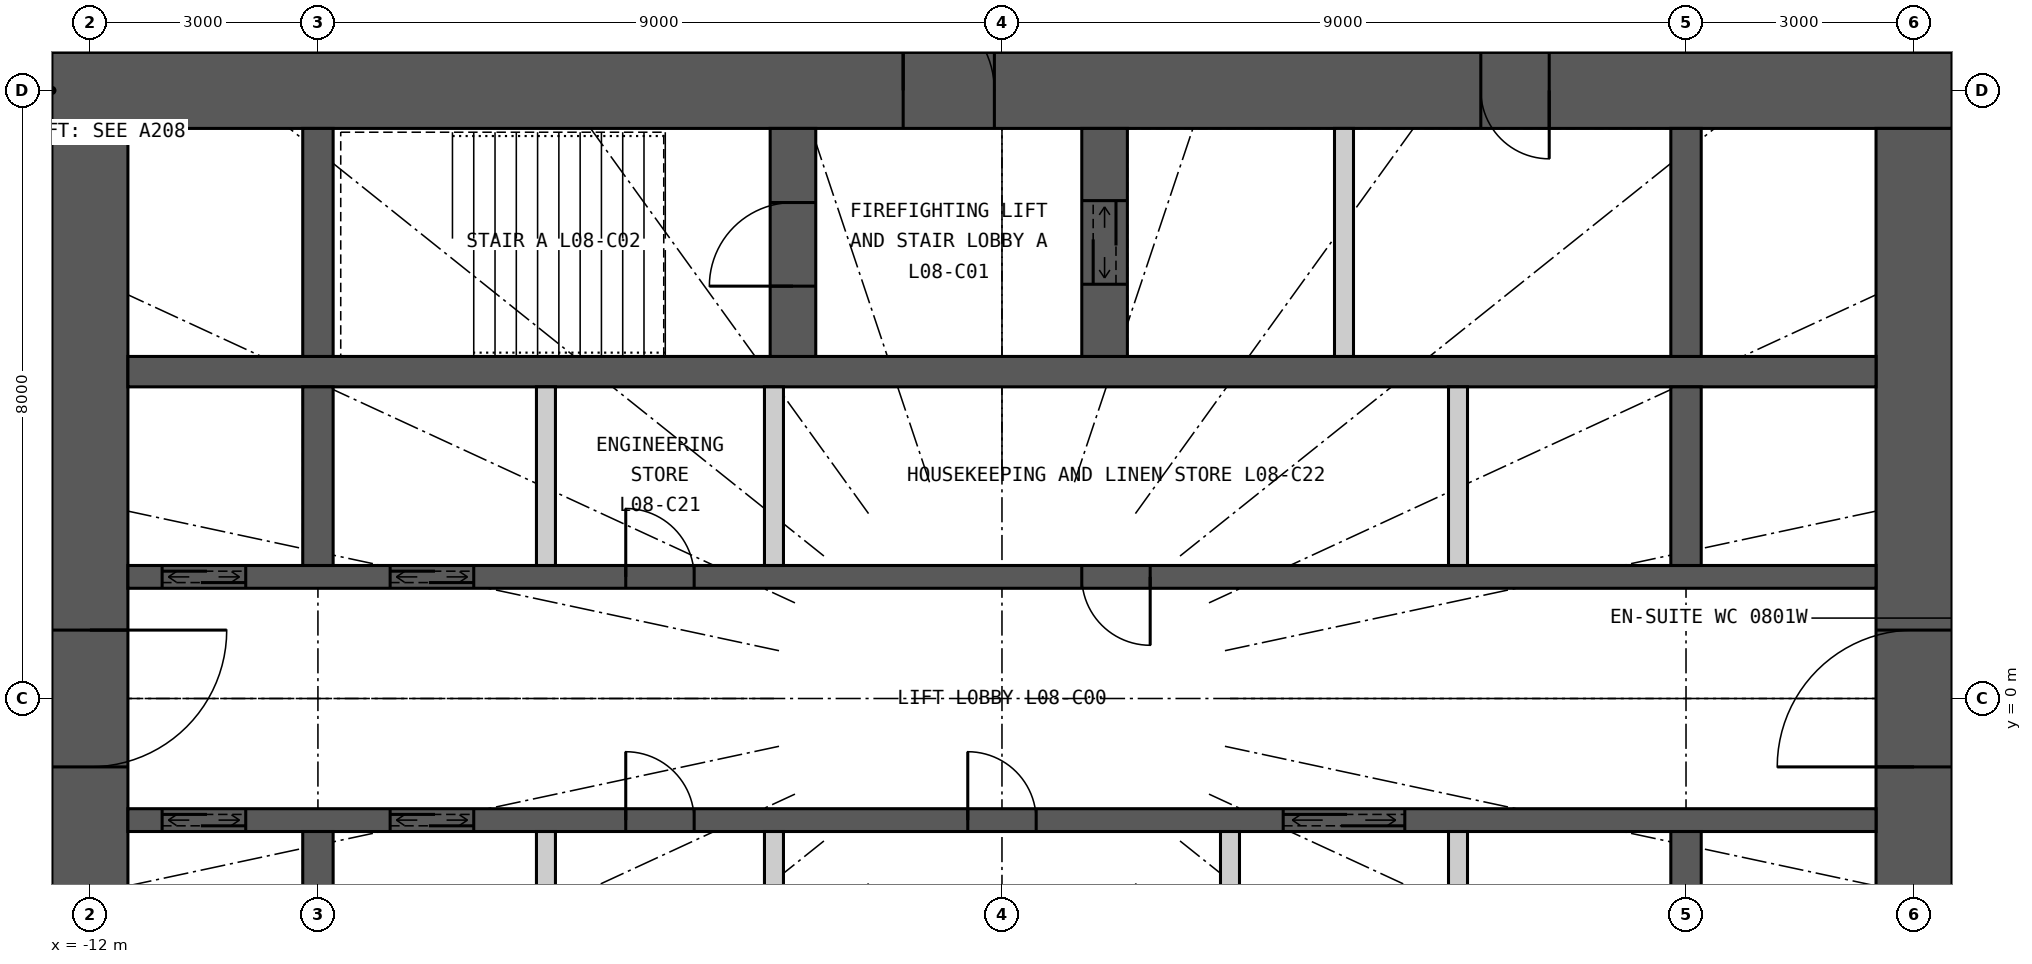
"""IFC4 building model, lengths in metres.
Left out: names, types, materials, properties, quantities, classifications, styles, units other than length and angle.
Written with IfcOpenShell. Run it as: python <this file> out.ifc"""

import sys

from ifc_helpers import new_model, si_unit, direction, frame, frame_2d, origin, place, context, subcontext, project, spatial, rectangle, extrude, element, fill, save


model = new_model("IFC4")
c1 = context("Model", 3, precision=1e-05, world=origin(), true_north=direction((0.0, 1.0)))
c2 = subcontext(c1, "Body", "Model", "MODEL_VIEW")
j1 = project(units=[si_unit("LENGTHUNIT", "METRE"), si_unit("PLANEANGLEUNIT", "RADIAN")], contexts=[c1])
p1 = place(None, origin())
s1 = spatial("IfcSite", under=j1, at=p1, CompositionType="ELEMENT")
p2 = place(p1, origin())
s2 = spatial("IfcBuilding", under=s1, at=p2, CompositionType="ELEMENT")
p3 = place(p2, frame((0.0, 0.0, 39.3)))
s3 = spatial("IfcBuildingStorey", under=s2, at=p3, CompositionType="ELEMENT", Elevation=39.3)
p4 = place(p3, frame((-12.5, 8.0, 0.0), z_axis=(0.0, 0.0, 1.0), x_axis=(1.0, 0.0, 0.0)))
e1 = element("IfcWall", 1, at=p4, inside=s3, PredefinedType="SHEAR", context=c2, shape_type="SweptSolid", body=[
    extrude(rectangle(XDim=25.0, YDim=1.0, at=frame_2d((12.5, 0.0))), origin(), (0.0, 0.0, 1.0), 3.3),
])
p5 = place(p4, frame((11.2, 0.0, 0.0)))
e2 = element("IfcOpeningElement", 2, at=p5, cuts=e1, PredefinedType="OPENING", context=c2, shape_type="SweptSolid", body=[
    extrude(rectangle(XDim=1.2, YDim=2.2, at=frame_2d((0.6, 1.1))), frame((0.0, 0.51, 0.0), z_axis=(0.0, -1.0, 0.0), x_axis=(1.0, 0.0, 0.0)), (0.0, 0.0, 1.0), 1.02),
])
p6 = place(p4, frame((18.8, 0.0, 0.0)))
e3 = element("IfcOpeningElement", 3, at=p6, cuts=e1, PredefinedType="OPENING", context=c2, shape_type="SweptSolid", body=[
    extrude(rectangle(XDim=0.9, YDim=2.2, at=frame_2d((0.45, 1.1))), frame((0.0, 0.51, 0.0), z_axis=(0.0, -1.0, 0.0), x_axis=(1.0, 0.0, 0.0)), (0.0, 0.0, 1.0), 1.02),
])
p7 = place(p3, frame((12.0, -7.5, 0.0), z_axis=(0.0, 0.0, 1.0), x_axis=(0.0, 1.0, 0.0)))
e4 = element("IfcWall", 4, at=p7, inside=s3, PredefinedType="SHEAR", context=c2, shape_type="SweptSolid", body=[
    extrude(rectangle(XDim=15.0, YDim=1.0, at=frame_2d((7.5, 0.0))), origin(), (0.0, 0.0, 1.0), 3.3),
])
p8 = place(p7, frame((6.6, 0.0, 0.0)))
e5 = element("IfcOpeningElement", 5, at=p8, cuts=e4, PredefinedType="OPENING", context=c2, shape_type="SweptSolid", body=[
    extrude(rectangle(XDim=1.8, YDim=2.2, at=frame_2d((0.9, 1.1))), frame((0.0, 0.51, 0.0), z_axis=(0.0, -1.0, 0.0), x_axis=(1.0, 0.0, 0.0)), (0.0, 0.0, 1.0), 1.02),
])
p9 = place(p3, frame((-12.0, 7.5, 0.0), z_axis=(0.0, 0.0, 1.0), x_axis=(0.0, -1.0, 0.0)))
e6 = element("IfcWall", 6, at=p9, inside=s3, PredefinedType="SHEAR", context=c2, shape_type="SweptSolid", body=[
    extrude(rectangle(XDim=15.0, YDim=1.0, at=frame_2d((7.5, 0.0))), origin(), (0.0, 0.0, 1.0), 3.3),
])
p10 = place(p9, frame((6.6, 0.0, 0.0)))
e7 = element("IfcOpeningElement", 7, at=p10, cuts=e6, PredefinedType="OPENING", context=c2, shape_type="SweptSolid", body=[
    extrude(rectangle(XDim=1.8, YDim=2.2, at=frame_2d((0.9, 1.1))), frame((0.0, 0.51, 0.0), z_axis=(0.0, -1.0, 0.0), x_axis=(1.0, 0.0, 0.0)), (0.0, 0.0, 1.0), 1.02),
])
p11 = place(p3, frame((-11.5, 4.3, 0.0), z_axis=(0.0, 0.0, 1.0), x_axis=(1.0, 0.0, 0.0)))
e8 = element("IfcWall", 8, at=p11, inside=s3, PredefinedType="SHEAR", context=c2, shape_type="SweptSolid", body=[
    extrude(rectangle(XDim=23.0, YDim=0.4, at=frame_2d((11.5, 0.0))), origin(), (0.0, 0.0, 1.0), 3.3),
])
p12 = place(p3, frame((-11.5, 1.6, 0.0), z_axis=(0.0, 0.0, 1.0), x_axis=(1.0, 0.0, 0.0)))
e9 = element("IfcWall", 9, at=p12, inside=s3, PredefinedType="SHEAR", context=c2, shape_type="SweptSolid", body=[
    extrude(rectangle(XDim=23.0, YDim=0.3, at=frame_2d((11.5, 0.0))), origin(), (0.0, 0.0, 1.0), 3.3),
])
p13 = place(p12, frame((0.45, 0.0, 0.0)))
e10 = element("IfcOpeningElement", 10, at=p13, cuts=e9, PredefinedType="OPENING", context=c2, shape_type="SweptSolid", body=[
    extrude(rectangle(XDim=1.1, YDim=2.2, at=frame_2d((0.55, 1.1))), frame((0.0, 0.16, 0.0), z_axis=(0.0, -1.0, 0.0), x_axis=(1.0, 0.0, 0.0)), (0.0, 0.0, 1.0), 0.32),
])
p14 = place(p12, frame((3.45, 0.0, 0.0)))
e11 = element("IfcOpeningElement", 11, at=p14, cuts=e9, PredefinedType="OPENING", context=c2, shape_type="SweptSolid", body=[
    extrude(rectangle(XDim=1.1, YDim=2.2, at=frame_2d((0.55, 1.1))), frame((0.0, 0.16, 0.0), z_axis=(0.0, -1.0, 0.0), x_axis=(1.0, 0.0, 0.0)), (0.0, 0.0, 1.0), 0.32),
])
p15 = place(p12, frame((6.55, 0.0, 0.0)))
e12 = element("IfcOpeningElement", 12, at=p15, cuts=e9, PredefinedType="OPENING", context=c2, shape_type="SweptSolid", body=[
    extrude(rectangle(XDim=0.9, YDim=2.2, at=frame_2d((0.45, 1.1))), frame((0.0, 0.16, 0.0), z_axis=(0.0, -1.0, 0.0), x_axis=(1.0, 0.0, 0.0)), (0.0, 0.0, 1.0), 0.32),
])
p16 = place(p12, frame((12.55, 0.0, 0.0)))
e13 = element("IfcOpeningElement", 13, at=p16, cuts=e9, PredefinedType="OPENING", context=c2, shape_type="SweptSolid", body=[
    extrude(rectangle(XDim=0.9, YDim=2.2, at=frame_2d((0.45, 1.1))), frame((0.0, 0.16, 0.0), z_axis=(0.0, -1.0, 0.0), x_axis=(1.0, 0.0, 0.0)), (0.0, 0.0, 1.0), 0.32),
])
p17 = place(p3, frame((-11.5, -1.6, 0.0), z_axis=(0.0, 0.0, 1.0), x_axis=(1.0, 0.0, 0.0)))
e14 = element("IfcWall", 14, at=p17, inside=s3, PredefinedType="SHEAR", context=c2, shape_type="SweptSolid", body=[
    extrude(rectangle(XDim=23.0, YDim=0.3, at=frame_2d((11.5, 0.0))), origin(), (0.0, 0.0, 1.0), 3.3),
])
p18 = place(p17, frame((0.45, 0.0, 0.0)))
e15 = element("IfcOpeningElement", 15, at=p18, cuts=e14, PredefinedType="OPENING", context=c2, shape_type="SweptSolid", body=[
    extrude(rectangle(XDim=1.1, YDim=2.2, at=frame_2d((0.55, 1.1))), frame((0.0, 0.16, 0.0), z_axis=(0.0, -1.0, 0.0), x_axis=(1.0, 0.0, 0.0)), (0.0, 0.0, 1.0), 0.32),
])
p19 = place(p17, frame((3.45, 0.0, 0.0)))
e16 = element("IfcOpeningElement", 16, at=p19, cuts=e14, PredefinedType="OPENING", context=c2, shape_type="SweptSolid", body=[
    extrude(rectangle(XDim=1.1, YDim=2.2, at=frame_2d((0.55, 1.1))), frame((0.0, 0.16, 0.0), z_axis=(0.0, -1.0, 0.0), x_axis=(1.0, 0.0, 0.0)), (0.0, 0.0, 1.0), 0.32),
])
p20 = place(p17, frame((15.2, 0.0, 0.0)))
e17 = element("IfcOpeningElement", 17, at=p20, cuts=e14, PredefinedType="OPENING", context=c2, shape_type="SweptSolid", body=[
    extrude(rectangle(XDim=1.6, YDim=2.4, at=frame_2d((0.8, 1.2))), frame((0.0, 0.16, 0.0), z_axis=(0.0, -1.0, 0.0), x_axis=(1.0, 0.0, 0.0)), (0.0, 0.0, 1.0), 0.32),
])
p21 = place(p17, frame((6.55, 0.0, 0.0)))
e18 = element("IfcOpeningElement", 18, at=p21, cuts=e14, PredefinedType="OPENING", context=c2, shape_type="SweptSolid", body=[
    extrude(rectangle(XDim=0.9, YDim=2.2, at=frame_2d((0.45, 1.1))), frame((0.0, 0.16, 0.0), z_axis=(0.0, -1.0, 0.0), x_axis=(1.0, 0.0, 0.0)), (0.0, 0.0, 1.0), 0.32),
])
p22 = place(p17, frame((11.05, 0.0, 0.0)))
e19 = element("IfcOpeningElement", 19, at=p22, cuts=e14, PredefinedType="OPENING", context=c2, shape_type="SweptSolid", body=[
    extrude(rectangle(XDim=0.9, YDim=2.2, at=frame_2d((0.45, 1.1))), frame((0.0, 0.16, 0.0), z_axis=(0.0, -1.0, 0.0), x_axis=(1.0, 0.0, 0.0)), (0.0, 0.0, 1.0), 0.32),
])
p23 = place(p3, frame((-9.0, 4.5, 0.0), z_axis=(0.0, 0.0, 1.0), x_axis=(0.0, 1.0, 0.0)))
e20 = element("IfcWall", 20, at=p23, inside=s3, PredefinedType="SHEAR", context=c2, shape_type="SweptSolid", body=[
    extrude(rectangle(XDim=3.0, YDim=0.4, at=frame_2d((1.5, 0.0))), origin(), (0.0, 0.0, 1.0), 3.3),
])
for number, where, z_axis, x_axis in (
    (21, (-9.0, 1.75, 0.0), (0.0, 0.0, 1.0), (0.0, 1.0, 0.0)),
    (22, (-9.0, -4.1, 0.0), (0.0, 0.0, 1.0), (0.0, 1.0, 0.0)),
):
    element("IfcWall", number, at=place(p3, frame(where, z_axis=z_axis, x_axis=x_axis)), inside=s3, PredefinedType="SHEAR", context=c2, shape_type="SweptSolid", body=[
        extrude(rectangle(XDim=2.35, YDim=0.4, at=frame_2d((1.175, 0.0))), origin(), (0.0, 0.0, 1.0), 3.3),
    ])
p24 = place(p3, frame((9.0, 4.5, 0.0), z_axis=(0.0, 0.0, 1.0), x_axis=(0.0, 1.0, 0.0)))
e23 = element("IfcWall", 23, at=p24, inside=s3, PredefinedType="SHEAR", context=c2, shape_type="SweptSolid", body=[
    extrude(rectangle(XDim=3.0, YDim=0.4, at=frame_2d((1.5, 0.0))), origin(), (0.0, 0.0, 1.0), 3.3),
])
for number, where, z_axis, x_axis in (
    (24, (9.0, 1.75, 0.0), (0.0, 0.0, 1.0), (0.0, 1.0, 0.0)),
    (25, (9.0, -4.1, 0.0), (0.0, 0.0, 1.0), (0.0, 1.0, 0.0)),
):
    element("IfcWall", number, at=place(p3, frame(where, z_axis=z_axis, x_axis=x_axis)), inside=s3, PredefinedType="SHEAR", context=c2, shape_type="SweptSolid", body=[
        extrude(rectangle(XDim=2.35, YDim=0.4, at=frame_2d((1.175, 0.0))), origin(), (0.0, 0.0, 1.0), 3.3),
    ])
p25 = place(p3, frame((-2.75, 4.5, 0.0), z_axis=(0.0, 0.0, 1.0), x_axis=(0.0, 1.0, 0.0)))
e26 = element("IfcWall", 26, at=p25, inside=s3, PredefinedType="SHEAR", context=c2, shape_type="SweptSolid", body=[
    extrude(rectangle(XDim=3.0, YDim=0.6, at=frame_2d((1.5, 0.0))), origin(), (0.0, 0.0, 1.0), 3.3),
])
p26 = place(p25, frame((0.925, 0.0, 0.0)))
e27 = element("IfcOpeningElement", 27, at=p26, cuts=e26, PredefinedType="OPENING", context=c2, shape_type="SweptSolid", body=[
    extrude(rectangle(XDim=1.1, YDim=2.2, at=frame_2d((0.55, 1.1))), frame((0.0, 0.31, 0.0), z_axis=(0.0, -1.0, 0.0), x_axis=(1.0, 0.0, 0.0)), (0.0, 0.0, 1.0), 0.62),
])
p27 = place(p3, frame((1.35, 4.5, 0.0), z_axis=(0.0, 0.0, 1.0), x_axis=(0.0, 1.0, 0.0)))
e28 = element("IfcWall", 28, at=p27, inside=s3, PredefinedType="SHEAR", context=c2, shape_type="SweptSolid", body=[
    extrude(rectangle(XDim=3.0, YDim=0.6, at=frame_2d((1.5, 0.0))), origin(), (0.0, 0.0, 1.0), 3.3),
])
p28 = place(p27, frame((0.95, 0.0, 0.0)))
e29 = element("IfcOpeningElement", 29, at=p28, cuts=e28, PredefinedType="OPENING", context=c2, shape_type="SweptSolid", body=[
    extrude(rectangle(XDim=1.1, YDim=2.2, at=frame_2d((0.55, 1.1))), frame((0.0, 0.31, 0.0), z_axis=(0.0, -1.0, 0.0), x_axis=(1.0, 0.0, 0.0)), (0.0, 0.0, 1.0), 0.62),
])
p29 = place(p3, frame((4.5, 4.5, 0.0), z_axis=(0.0, 0.0, 1.0), x_axis=(0.0, 1.0, 0.0)))
e30 = element("IfcWall", 30, at=p29, inside=s3, PredefinedType="PARTITIONING", context=c2, shape_type="SweptSolid", body=[
    extrude(rectangle(XDim=3.0, YDim=0.25, at=frame_2d((1.5, 0.0))), origin(), (0.0, 0.0, 1.0), 3.3),
])
for number, where, z_axis, x_axis in (
    (31, (-6.0, 1.75, 0.0), (0.0, 0.0, 1.0), (0.0, 1.0, 0.0)),
    (32, (-3.0, 1.75, 0.0), (0.0, 0.0, 1.0), (0.0, 1.0, 0.0)),
    (33, (6.0, 1.75, 0.0), (0.0, 0.0, 1.0), (0.0, 1.0, 0.0)),
    (34, (-6.0, -4.1, 0.0), (0.0, 0.0, 1.0), (0.0, 1.0, 0.0)),
    (35, (-3.0, -4.1, 0.0), (0.0, 0.0, 1.0), (0.0, 1.0, 0.0)),
    (36, (3.0, -4.1, 0.0), (0.0, 0.0, 1.0), (0.0, 1.0, 0.0)),
    (37, (6.0, -4.1, 0.0), (0.0, 0.0, 1.0), (0.0, 1.0, 0.0)),
):
    element("IfcWall", number, at=place(p3, frame(where, z_axis=z_axis, x_axis=x_axis)), inside=s3, PredefinedType="PARTITIONING", context=c2, shape_type="SweptSolid", body=[
        extrude(rectangle(XDim=2.35, YDim=0.25, at=frame_2d((1.175, 0.0))), origin(), (0.0, 0.0, 1.0), 3.3),
    ])
p30 = place(p5, origin())
e38 = element("IfcDoor", 38, at=p30, inside=s3, OperationType="SINGLE_SWING_LEFT", PredefinedType="DOOR", context=c2, shape_type="SweptSolid", body=[
    extrude(rectangle(XDim=1.2, YDim=2.2, at=frame_2d((0.6, 1.1))), frame((0.0, 0.025, 0.0), z_axis=(0.0, -1.0, 0.0), x_axis=(1.0, 0.0, 0.0)), (0.0, 0.0, 1.0), 0.05),
])
fill(e2, e38)
p31 = place(p26, origin())
e39 = element("IfcDoor", 39, at=p31, inside=s3, OperationType="SINGLE_SWING_LEFT", PredefinedType="DOOR", context=c2, shape_type="SweptSolid", body=[
    extrude(rectangle(XDim=1.1, YDim=2.2, at=frame_2d((0.55, 1.1))), frame((0.0, 0.025, 0.0), z_axis=(0.0, -1.0, 0.0), x_axis=(1.0, 0.0, 0.0)), (0.0, 0.0, 1.0), 0.05),
])
fill(e27, e39)
p32 = place(p28, origin())
e40 = element("IfcDoor", 40, at=p32, inside=s3, OperationType="DOUBLE_DOOR_SLIDING", PredefinedType="DOOR", context=c2, shape_type="SweptSolid", body=[
    extrude(rectangle(XDim=1.1, YDim=2.2, at=frame_2d((0.55, 1.1))), frame((0.0, 0.025, 0.0), z_axis=(0.0, -1.0, 0.0), x_axis=(1.0, 0.0, 0.0)), (0.0, 0.0, 1.0), 0.05),
])
fill(e29, e40)
p33 = place(p6, origin())
e41 = element("IfcDoor", 41, at=p33, inside=s3, OperationType="SINGLE_SWING_RIGHT", PredefinedType="DOOR", context=c2, shape_type="SweptSolid", body=[
    extrude(rectangle(XDim=0.9, YDim=2.2, at=frame_2d((0.45, 1.1))), frame((0.0, 0.025, 0.0), z_axis=(0.0, -1.0, 0.0), x_axis=(1.0, 0.0, 0.0)), (0.0, 0.0, 1.0), 0.05),
])
fill(e3, e41)
p34 = place(p13, origin())
e42 = element("IfcDoor", 42, at=p34, inside=s3, OperationType="DOUBLE_DOOR_SLIDING", PredefinedType="DOOR", context=c2, shape_type="SweptSolid", body=[
    extrude(rectangle(XDim=1.1, YDim=2.2, at=frame_2d((0.55, 1.1))), frame((0.0, 0.025, 0.0), z_axis=(0.0, -1.0, 0.0), x_axis=(1.0, 0.0, 0.0)), (0.0, 0.0, 1.0), 0.05),
])
fill(e10, e42)
p35 = place(p14, origin())
e43 = element("IfcDoor", 43, at=p35, inside=s3, OperationType="DOUBLE_DOOR_SLIDING", PredefinedType="DOOR", context=c2, shape_type="SweptSolid", body=[
    extrude(rectangle(XDim=1.1, YDim=2.2, at=frame_2d((0.55, 1.1))), frame((0.0, 0.025, 0.0), z_axis=(0.0, -1.0, 0.0), x_axis=(1.0, 0.0, 0.0)), (0.0, 0.0, 1.0), 0.05),
])
fill(e11, e43)
p36 = place(p18, origin())
e44 = element("IfcDoor", 44, at=p36, inside=s3, OperationType="DOUBLE_DOOR_SLIDING", PredefinedType="DOOR", context=c2, shape_type="SweptSolid", body=[
    extrude(rectangle(XDim=1.1, YDim=2.2, at=frame_2d((0.55, 1.1))), frame((0.0, 0.025, 0.0), z_axis=(0.0, -1.0, 0.0), x_axis=(1.0, 0.0, 0.0)), (0.0, 0.0, 1.0), 0.05),
])
fill(e15, e44)
p37 = place(p19, origin())
e45 = element("IfcDoor", 45, at=p37, inside=s3, OperationType="DOUBLE_DOOR_SLIDING", PredefinedType="DOOR", context=c2, shape_type="SweptSolid", body=[
    extrude(rectangle(XDim=1.1, YDim=2.2, at=frame_2d((0.55, 1.1))), frame((0.0, 0.025, 0.0), z_axis=(0.0, -1.0, 0.0), x_axis=(1.0, 0.0, 0.0)), (0.0, 0.0, 1.0), 0.05),
])
fill(e16, e45)
p38 = place(p20, origin())
e46 = element("IfcDoor", 46, at=p38, inside=s3, OperationType="DOUBLE_DOOR_SLIDING", PredefinedType="DOOR", context=c2, shape_type="SweptSolid", body=[
    extrude(rectangle(XDim=1.6, YDim=2.4, at=frame_2d((0.8, 1.2))), frame((0.0, 0.025, 0.0), z_axis=(0.0, -1.0, 0.0), x_axis=(1.0, 0.0, 0.0)), (0.0, 0.0, 1.0), 0.05),
])
fill(e17, e46)
p39 = place(p15, origin())
e47 = element("IfcDoor", 47, at=p39, inside=s3, OperationType="SINGLE_SWING_LEFT", PredefinedType="DOOR", context=c2, shape_type="SweptSolid", body=[
    extrude(rectangle(XDim=0.9, YDim=2.2, at=frame_2d((0.45, 1.1))), frame((0.0, 0.025, 0.0), z_axis=(0.0, -1.0, 0.0), x_axis=(1.0, 0.0, 0.0)), (0.0, 0.0, 1.0), 0.05),
])
fill(e12, e47)
p40 = place(p16, origin())
e48 = element("IfcDoor", 48, at=p40, inside=s3, OperationType="SINGLE_SWING_RIGHT", PredefinedType="DOOR", context=c2, shape_type="SweptSolid", body=[
    extrude(rectangle(XDim=0.9, YDim=2.2, at=frame_2d((0.45, 1.1))), frame((0.0, 0.025, 0.0), z_axis=(0.0, -1.0, 0.0), x_axis=(1.0, 0.0, 0.0)), (0.0, 0.0, 1.0), 0.05),
])
fill(e13, e48)
p41 = place(p21, origin())
e49 = element("IfcDoor", 49, at=p41, inside=s3, OperationType="SINGLE_SWING_LEFT", PredefinedType="DOOR", context=c2, shape_type="SweptSolid", body=[
    extrude(rectangle(XDim=0.9, YDim=2.2, at=frame_2d((0.45, 1.1))), frame((0.0, 0.025, 0.0), z_axis=(0.0, -1.0, 0.0), x_axis=(1.0, 0.0, 0.0)), (0.0, 0.0, 1.0), 0.05),
])
fill(e18, e49)
p42 = place(p22, origin())
e50 = element("IfcDoor", 50, at=p42, inside=s3, OperationType="SINGLE_SWING_LEFT", PredefinedType="DOOR", context=c2, shape_type="SweptSolid", body=[
    extrude(rectangle(XDim=0.9, YDim=2.2, at=frame_2d((0.45, 1.1))), frame((0.0, 0.025, 0.0), z_axis=(0.0, -1.0, 0.0), x_axis=(1.0, 0.0, 0.0)), (0.0, 0.0, 1.0), 0.05),
])
fill(e19, e50)
p43 = place(p8, origin())
e51 = element("IfcDoor", 51, at=p43, inside=s3, OperationType="DOUBLE_DOOR_DOUBLE_SWING", PredefinedType="DOOR", context=c2, shape_type="SweptSolid", body=[
    extrude(rectangle(XDim=1.8, YDim=2.2, at=frame_2d((0.9, 1.1))), frame((0.0, 0.025, 0.0), z_axis=(0.0, -1.0, 0.0), x_axis=(1.0, 0.0, 0.0)), (0.0, 0.0, 1.0), 0.05),
])
fill(e5, e51)
p44 = place(p10, origin())
e52 = element("IfcDoor", 52, at=p44, inside=s3, OperationType="DOUBLE_DOOR_DOUBLE_SWING", PredefinedType="DOOR", context=c2, shape_type="SweptSolid", body=[
    extrude(rectangle(XDim=1.8, YDim=2.2, at=frame_2d((0.9, 1.1))), frame((0.0, 0.025, 0.0), z_axis=(0.0, -1.0, 0.0), x_axis=(1.0, 0.0, 0.0)), (0.0, 0.0, 1.0), 0.05),
])
fill(e7, e52)
save(model, sys.argv[1])
